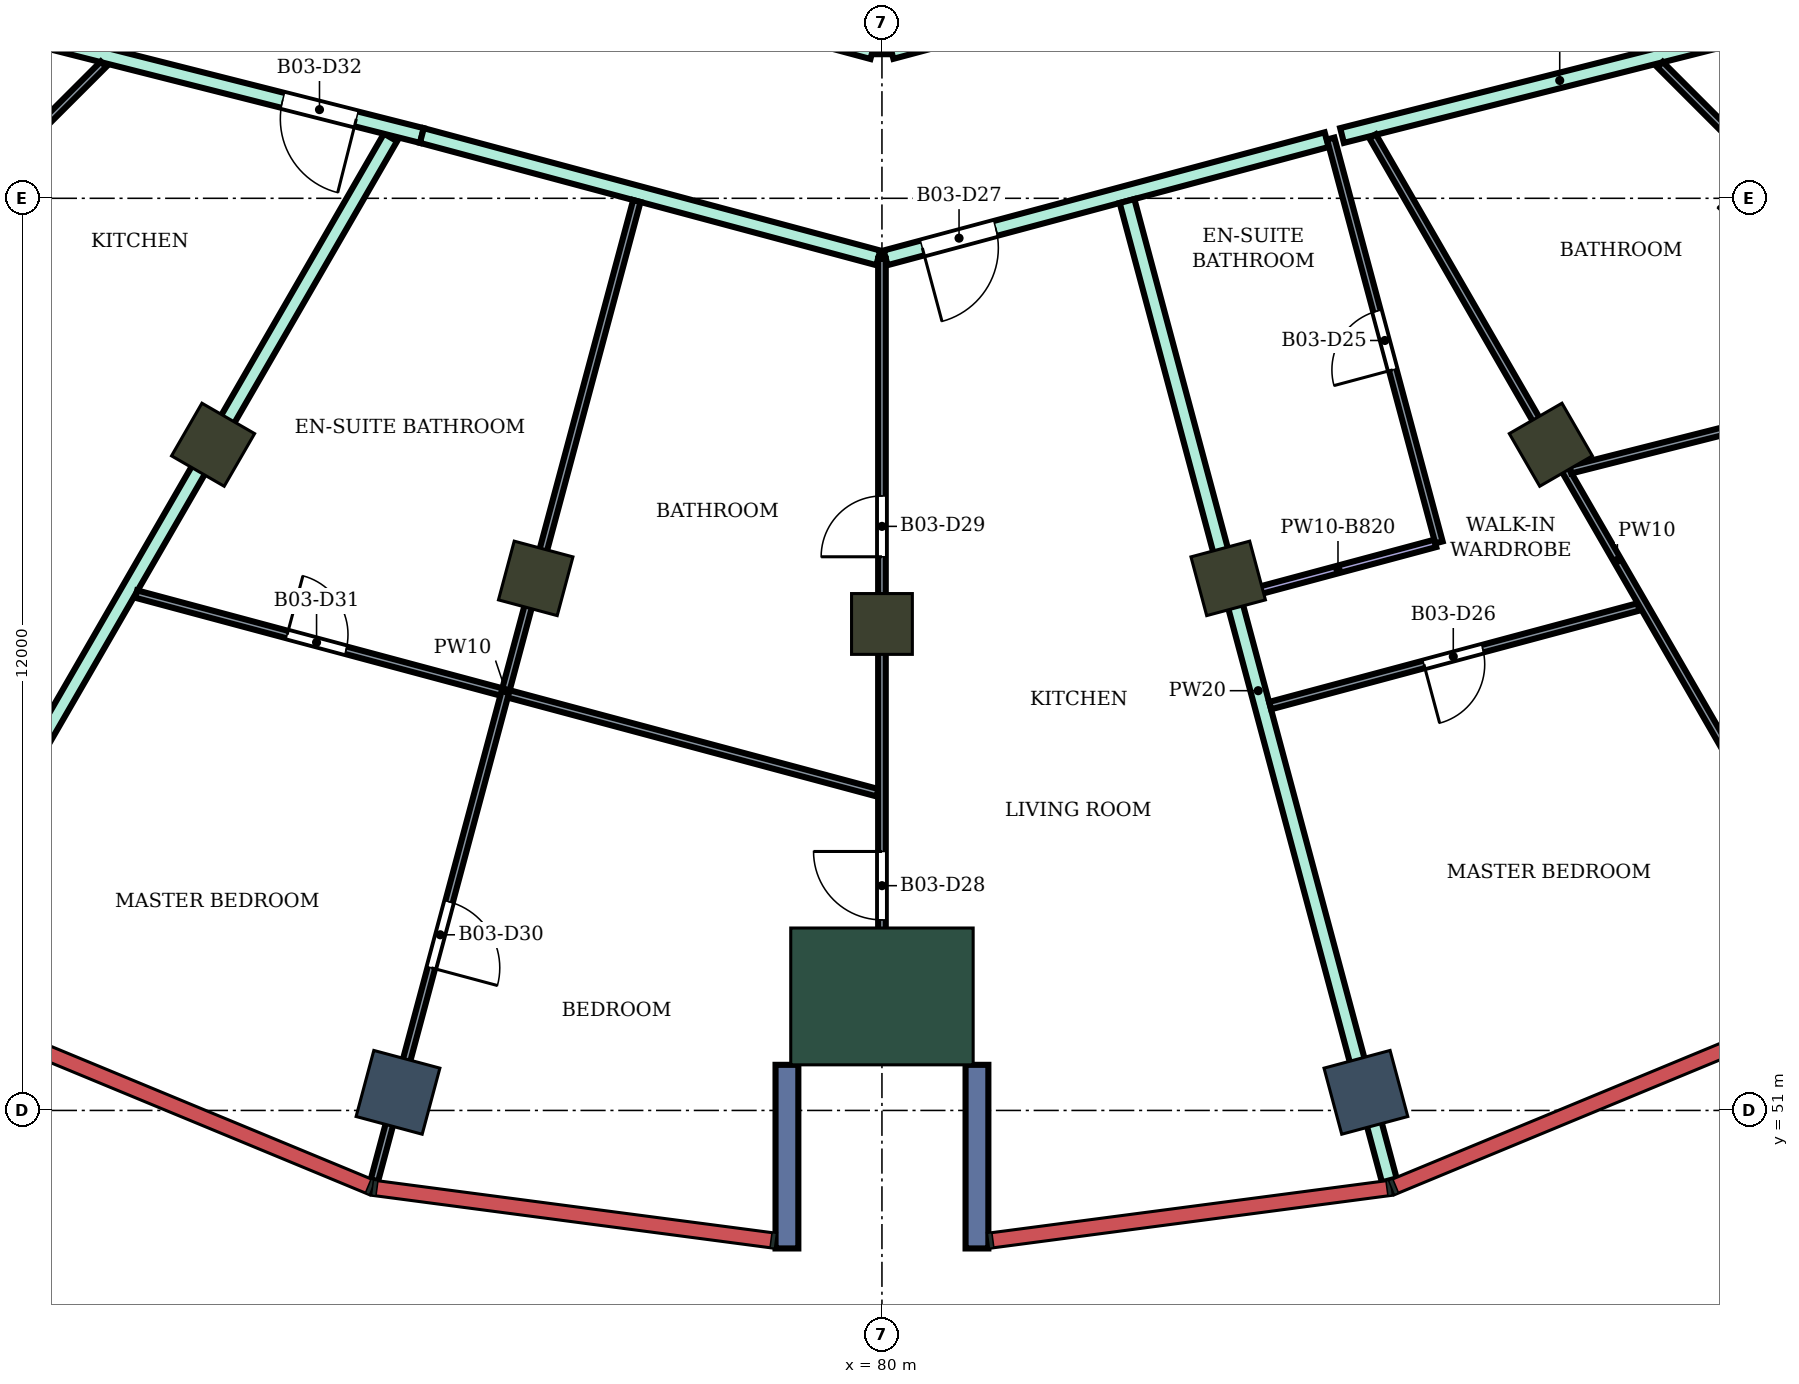
"""IFC4 building model, lengths in metres.
Left out: names, types, materials, properties, quantities, classifications, styles, units other than length and angle.
Written with IfcOpenShell. Run it as: python <this file> out.ifc"""

import sys

from ifc_helpers import new_model, si_unit, direction, frame, frame_2d, origin, origin_2d, place, context, subcontext, project, spatial, rectangle, extrude, element, fill, save


model = new_model("IFC4")
c1 = context("Model", 3, precision=1e-05, world=origin(), true_north=direction((0.0, 1.0)))
c2 = subcontext(c1, "Body", "Model", "MODEL_VIEW")
j1 = project(units=[si_unit("LENGTHUNIT", "METRE"), si_unit("PLANEANGLEUNIT", "RADIAN")], contexts=[c1])
p1 = place(None, origin())
s1 = spatial("IfcSite", under=j1, at=p1, CompositionType="ELEMENT")
p2 = place(p1, origin())
s2 = spatial("IfcBuilding", under=s1, at=p2, CompositionType="ELEMENT")
p3 = place(p2, frame((0.0, 0.0, 237.3)))
s3 = spatial("IfcBuildingStorey", under=s2, at=p3, CompositionType="ELEMENT", Elevation=237.3)
for number, where, z_axis, x_axis in (
    (1, (73.633, 51.238, 0.0), (0.0, 0.0, 1.0), (-0.259, -0.966, 0.0)),
    (2, (86.367, 51.238, 0.0), (0.0, 0.0, 1.0), (0.259, -0.966, 0.0)),
):
    element("IfcColumn", number, at=place(p3, frame(where, z_axis=z_axis, x_axis=x_axis)), inside=s3, PredefinedType="COLUMN", context=c2, shape_type="SweptSolid", body=[
        extrude(rectangle(XDim=0.9, YDim=0.9, at=origin_2d()), origin(), (0.0, 0.0, 1.0), 4.2),
    ])
for number, where, z_axis, x_axis in (
    (3, (71.2, 59.758, 0.0), (0.0, 0.0, 1.0), (-0.5, -0.866, 0.0)),
    (4, (75.445, 58.0, 0.0), (0.0, 0.0, 1.0), (-0.259, -0.966, 0.0)),
    (5, (80.0, 57.4, 0.0), (0.0, 0.0, 1.0), (0.0, -1.0, 0.0)),
    (6, (84.555, 58.0, 0.0), (0.0, 0.0, 1.0), (0.259, -0.966, 0.0)),
    (7, (88.8, 59.758, 0.0), (0.0, 0.0, 1.0), (0.5, -0.866, 0.0)),
):
    element("IfcColumn", number, at=place(p3, frame(where, z_axis=z_axis, x_axis=x_axis)), inside=s3, PredefinedType="COLUMN", context=c2, shape_type="SweptSolid", body=[
        extrude(rectangle(XDim=0.8, YDim=0.8, at=origin_2d()), origin(), (0.0, 0.0, 1.0), 4.2),
    ])
p4 = place(p3, frame((80.0, 52.5, 0.0), z_axis=(0.0, 0.0, 1.0), x_axis=(0.0, -1.0, 0.0)))
e8 = element("IfcColumn", 8, at=p4, inside=s3, PredefinedType="COLUMN", context=c2, shape_type="SweptSolid", body=[
    extrude(rectangle(XDim=1.8, YDim=2.4, at=origin_2d()), origin(), (0.0, 0.0, 1.0), 4.2),
])
for number, where, z_axis, x_axis in (
    (9, (78.75, 51.6, 0.0), (0.0, 0.0, 1.0), (0.0, -1.0, 0.0)),
    (10, (81.25, 51.6, 0.0), (0.0, 0.0, 1.0), (0.0, -1.0, 0.0)),
):
    element("IfcWall", number, at=place(p3, frame(where, z_axis=z_axis, x_axis=x_axis)), inside=s3, PredefinedType="NOTDEFINED", context=c2, shape_type="SweptSolid", body=[
        extrude(rectangle(XDim=2.416, YDim=0.3, at=frame_2d((1.208, 0.0))), origin(), (0.0, 0.0, 1.0), 4.2),
    ])
p5 = place(p3, frame((67.1, 52.659, 0.0), z_axis=(0.0, 0.0, 1.0), x_axis=(0.500128690501, 0.865951091539, 0.0)))
e11 = element("IfcWall", 11, at=p5, inside=s3, PredefinedType="PARTITIONING", context=c2, shape_type="SweptSolid", body=[
    extrude(rectangle(XDim=12.866, YDim=0.2, at=frame_2d((6.433, 0.0))), origin(), (0.0, 0.0, 1.0), 3.75),
])
p6 = place(p3, frame((68.2, 65.28, 0.0), z_axis=(0.0, 0.0, 1.0), x_axis=(0.969450596516, -0.245286650503, 0.0)))
e12 = element("IfcWall", 12, at=p6, inside=s3, PredefinedType="PARTITIONING", context=c2, shape_type="SweptSolid", body=[
    extrude(rectangle(XDim=5.928, YDim=0.2, at=frame_2d((2.964, 0.0))), origin(), (0.0, 0.0, 1.0), 3.75),
])
p7 = place(p6, frame((4.039, 0.0, 0.0)))
e13 = element("IfcOpeningElement", 13, at=p7, cuts=e12, PredefinedType="OPENING", context=c2, shape_type="SweptSolid", body=[
    extrude(rectangle(XDim=1.0, YDim=2.1, at=frame_2d((0.5, 1.05))), frame((0.0, 0.11, 0.0), z_axis=(0.0, -1.0, 0.0), x_axis=(1.0, 0.0, 0.0)), (0.0, 0.0, 1.0), 0.22),
])
p8 = place(p3, frame((73.947, 63.826, 0.0), z_axis=(0.0, 0.0, 1.0), x_axis=(0.965908253407, -0.258884619088, 0.0)))
e14 = element("IfcWall", 14, at=p8, inside=s3, PredefinedType="PARTITIONING", context=c2, shape_type="SweptSolid", body=[
    extrude(rectangle(XDim=6.217, YDim=0.2, at=frame_2d((3.108, 0.0))), origin(), (0.0, 0.0, 1.0), 3.75),
])
p9 = place(p3, frame((74.603, 66.342, 0.0), z_axis=(0.0, 0.0, 1.0), x_axis=(0.965920893652, -0.258837453254, 0.0)))
e15 = element("IfcWall", 15, at=p9, inside=s3, PredefinedType="PARTITIONING", context=c2, shape_type="SweptSolid", body=[
    extrude(rectangle(XDim=5.458, YDim=0.2, at=frame_2d((2.729, 0.0))), origin(), (0.0, 0.0, 1.0), 3.75),
])
p10 = place(p9, frame((2.512, 0.0, 0.0)))
e16 = element("IfcOpeningElement", 16, at=p10, cuts=e15, PredefinedType="OPENING", context=c2, shape_type="SweptSolid", body=[
    extrude(rectangle(XDim=0.9, YDim=2.1, at=frame_2d((0.45, 1.05))), frame((0.0, 0.11, 0.0), z_axis=(0.0, -1.0, 0.0), x_axis=(1.0, 0.0, 0.0)), (0.0, 0.0, 1.0), 0.22),
])
p11 = place(p3, frame((80.125, 64.932, 0.0), z_axis=(0.0, 0.0, 1.0), x_axis=(0.966236955806, 0.257655089674, 0.0)))
e17 = element("IfcWall", 17, at=p11, inside=s3, PredefinedType="PARTITIONING", context=c2, shape_type="SweptSolid", body=[
    extrude(rectangle(XDim=8.039, YDim=0.2, at=frame_2d((4.02, 0.0))), origin(), (0.0, 0.0, 1.0), 3.75),
])
p12 = place(p11, frame((6.298, 0.0, 0.0)))
e18 = element("IfcOpeningElement", 18, at=p12, cuts=e17, PredefinedType="OPENING", context=c2, shape_type="SweptSolid", body=[
    extrude(rectangle(XDim=0.9, YDim=2.1, at=frame_2d((0.45, 1.05))), frame((0.0, 0.11, 0.0), z_axis=(0.0, -1.0, 0.0), x_axis=(1.0, 0.0, 0.0)), (0.0, 0.0, 1.0), 0.22),
])
p13 = place(p11, frame((2.045, 0.0, 0.0)))
e19 = element("IfcOpeningElement", 19, at=p13, cuts=e17, PredefinedType="OPENING", context=c2, shape_type="SweptSolid", body=[
    extrude(rectangle(XDim=0.9, YDim=2.1, at=frame_2d((0.45, 1.05))), frame((0.0, 0.11, 0.0), z_axis=(0.0, -1.0, 0.0), x_axis=(1.0, 0.0, 0.0)), (0.0, 0.0, 1.0), 0.22),
])
p14 = place(p3, frame((80.048, 62.217, 0.0), z_axis=(0.0, 0.0, 1.0), x_axis=(0.965941520544, 0.258760466242, 0.0)))
e20 = element("IfcWall", 20, at=p14, inside=s3, PredefinedType="PARTITIONING", context=c2, shape_type="SweptSolid", body=[
    extrude(rectangle(XDim=6.006, YDim=0.2, at=frame_2d((3.003, 0.0))), origin(), (0.0, 0.0, 1.0), 3.75),
])
p15 = place(p14, frame((0.5, 0.0, 0.0)))
e21 = element("IfcOpeningElement", 21, at=p15, cuts=e20, PredefinedType="OPENING", context=c2, shape_type="SweptSolid", body=[
    extrude(rectangle(XDim=1.0, YDim=2.1, at=frame_2d((0.5, 1.05))), frame((0.0, 0.11, 0.0), z_axis=(0.0, -1.0, 0.0), x_axis=(1.0, 0.0, 0.0)), (0.0, 0.0, 1.0), 0.22),
])
p16 = place(p3, frame((80.0, 64.896, 0.0), z_axis=(0.0, 0.0, 1.0), x_axis=(0.0, 1.0, 0.0)))
e22 = element("IfcWall", 22, at=p16, inside=s3, PredefinedType="PARTITIONING", context=c2, shape_type="SweptSolid", body=[
    extrude(rectangle(XDim=2.405, YDim=0.2, at=frame_2d((1.203, 0.0))), origin(), (0.0, 0.0, 1.0), 3.75),
])
p17 = place(p3, frame((83.224, 62.964, 0.0), z_axis=(0.0, 0.0, 1.0), x_axis=(0.258742489642, -0.965946336012, 0.0)))
e23 = element("IfcWall", 23, at=p17, inside=s3, PredefinedType="PARTITIONING", context=c2, shape_type="SweptSolid", body=[
    extrude(rectangle(XDim=13.338, YDim=0.2, at=frame_2d((6.669, 0.0))), origin(), (0.0, 0.0, 1.0), 3.75),
])
p18 = place(p3, frame((86.053, 63.826, 0.0), z_axis=(0.0, 0.0, 1.0), x_axis=(0.969490004987, 0.245130843083, 0.0)))
e24 = element("IfcWall", 24, at=p18, inside=s3, PredefinedType="PARTITIONING", context=c2, shape_type="SweptSolid", body=[
    extrude(rectangle(XDim=5.908, YDim=0.2, at=frame_2d((2.954, 0.0))), origin(), (0.0, 0.0, 1.0), 3.75),
])
p19 = place(p3, frame((63.591, 58.6, 0.0), z_axis=(0.0, 0.0, 1.0), x_axis=(0.707274766636, 0.70693875582, 0.0)))
e25 = element("IfcWall", 25, at=p19, inside=s3, PredefinedType="PARTITIONING", context=c2, shape_type="SweptSolid", body=[
    extrude(rectangle(XDim=8.719, YDim=0.1, at=frame_2d((4.359, 0.0))), origin(), (0.0, 0.0, 1.0), 3.75),
])
p20 = place(p19, frame((1.729, 0.0, 0.0)))
e26 = element("IfcOpeningElement", 26, at=p20, cuts=e25, PredefinedType="OPENING", context=c2, shape_type="SweptSolid", body=[
    extrude(rectangle(XDim=0.9, YDim=2.1, at=frame_2d((0.45, 1.05))), frame((0.0, 0.06, 0.0), z_axis=(0.0, -1.0, 0.0), x_axis=(1.0, 0.0, 0.0)), (0.0, 0.0, 1.0), 0.12),
])
p21 = place(p19, frame((6.033, 0.0, 0.0)))
e27 = element("IfcOpeningElement", 27, at=p21, cuts=e25, PredefinedType="OPENING", context=c2, shape_type="SweptSolid", body=[
    extrude(rectangle(XDim=0.8, YDim=2.1, at=frame_2d((0.4, 1.05))), frame((0.0, 0.06, 0.0), z_axis=(0.0, -1.0, 0.0), x_axis=(1.0, 0.0, 0.0)), (0.0, 0.0, 1.0), 0.12),
])
p22 = place(p3, frame((70.188, 57.793, 0.0), z_axis=(0.0, 0.0, 1.0), x_axis=(0.965911138035, -0.258873856194, 0.0)))
e28 = element("IfcWall", 28, at=p22, inside=s3, PredefinedType="PARTITIONING", context=c2, shape_type="SweptSolid", body=[
    extrude(rectangle(XDim=10.098, YDim=0.1, at=frame_2d((5.049, 0.0))), origin(), (0.0, 0.0, 1.0), 3.75),
])
p23 = place(p22, frame((2.057, 0.0, 0.0)))
e29 = element("IfcOpeningElement", 29, at=p23, cuts=e28, PredefinedType="OPENING", context=c2, shape_type="SweptSolid", body=[
    extrude(rectangle(XDim=0.8, YDim=2.1, at=frame_2d((0.4, 1.05))), frame((0.0, 0.06, 0.0), z_axis=(0.0, -1.0, 0.0), x_axis=(1.0, 0.0, 0.0)), (0.0, 0.0, 1.0), 0.12),
])
p24 = place(p3, frame((73.323, 50.081, 0.0), z_axis=(0.0, 0.0, 1.0), x_axis=(0.258837030899, 0.96592100683, 0.0)))
e30 = element("IfcWall", 30, at=p24, inside=s3, PredefinedType="PARTITIONING", context=c2, shape_type="SweptSolid", body=[
    extrude(rectangle(XDim=13.338, YDim=0.1, at=frame_2d((6.669, 0.0))), origin(), (0.0, 0.0, 1.0), 3.75),
])
p25 = place(p24, frame((2.894, 0.0, 0.0)))
e31 = element("IfcOpeningElement", 31, at=p25, cuts=e30, PredefinedType="OPENING", context=c2, shape_type="SweptSolid", body=[
    extrude(rectangle(XDim=0.9, YDim=2.1, at=frame_2d((0.45, 1.05))), frame((0.0, 0.06, 0.0), z_axis=(0.0, -1.0, 0.0), x_axis=(1.0, 0.0, 0.0)), (0.0, 0.0, 1.0), 0.12),
])
p26 = place(p3, frame((80.0, 51.8, 0.0), z_axis=(0.0, 0.0, 1.0), x_axis=(0.0, 1.0, 0.0)))
e32 = element("IfcWall", 32, at=p26, inside=s3, PredefinedType="PARTITIONING", context=c2, shape_type="SweptSolid", body=[
    extrude(rectangle(XDim=10.404, YDim=0.1, at=frame_2d((5.202, 0.0))), origin(), (0.0, 0.0, 1.0), 3.75),
])
p27 = place(p26, frame((1.707, 0.0, 0.0)))
e33 = element("IfcOpeningElement", 33, at=p27, cuts=e32, PredefinedType="OPENING", context=c2, shape_type="SweptSolid", body=[
    extrude(rectangle(XDim=0.9, YDim=2.1, at=frame_2d((0.45, 1.05))), frame((0.0, 0.06, 0.0), z_axis=(0.0, -1.0, 0.0), x_axis=(1.0, 0.0, 0.0)), (0.0, 0.0, 1.0), 0.12),
])
p28 = place(p26, frame((6.484, 0.0, 0.0)))
e34 = element("IfcOpeningElement", 34, at=p28, cuts=e32, PredefinedType="OPENING", context=c2, shape_type="SweptSolid", body=[
    extrude(rectangle(XDim=0.8, YDim=2.1, at=frame_2d((0.4, 1.05))), frame((0.0, 0.06, 0.0), z_axis=(0.0, -1.0, 0.0), x_axis=(1.0, 0.0, 0.0)), (0.0, 0.0, 1.0), 0.12),
])
p29 = place(p3, frame((84.719, 57.774, 0.0), z_axis=(0.0, 0.0, 1.0), x_axis=(0.965902408875, 0.258906424273, 0.0)))
e35 = element("IfcWall", 35, at=p29, inside=s3, PredefinedType="PARTITIONING", context=c2, shape_type="SweptSolid", body=[
    extrude(rectangle(XDim=2.651, YDim=0.1, at=frame_2d((1.325, 0.0))), origin(), (0.0, 0.0, 1.0), 3.38),
])
p30 = place(p3, frame((85.108, 56.326, 0.0), z_axis=(0.0, 0.0, 1.0), x_axis=(0.965911122806, 0.258873913014, 0.0)))
e36 = element("IfcWall", 36, at=p30, inside=s3, PredefinedType="PARTITIONING", context=c2, shape_type="SweptSolid", body=[
    extrude(rectangle(XDim=5.017, YDim=0.1, at=frame_2d((2.509, 0.0))), origin(), (0.0, 0.0, 1.0), 3.75),
])
p31 = place(p30, frame((2.094, 0.0, 0.0)))
e37 = element("IfcOpeningElement", 37, at=p31, cuts=e36, PredefinedType="OPENING", context=c2, shape_type="SweptSolid", body=[
    extrude(rectangle(XDim=0.8, YDim=2.1, at=frame_2d((0.4, 1.05))), frame((0.0, 0.06, 0.0), z_axis=(0.0, -1.0, 0.0), x_axis=(1.0, 0.0, 0.0)), (0.0, 0.0, 1.0), 0.12),
])
p32 = place(p3, frame((85.904, 63.786, 0.0), z_axis=(0.0, 0.0, 1.0), x_axis=(0.258855888267, -0.96591595344, 0.0)))
e38 = element("IfcWall", 38, at=p32, inside=s3, PredefinedType="PARTITIONING", context=c2, shape_type="SweptSolid", body=[
    extrude(rectangle(XDim=5.5, YDim=0.1, at=frame_2d((2.75, 0.0))), origin(), (0.0, 0.0, 1.0), 3.75),
])
p33 = place(p32, frame((2.35, 0.0, 0.0)))
e39 = element("IfcOpeningElement", 39, at=p33, cuts=e38, PredefinedType="OPENING", context=c2, shape_type="SweptSolid", body=[
    extrude(rectangle(XDim=0.8, YDim=2.1, at=frame_2d((0.4, 1.05))), frame((0.0, 0.06, 0.0), z_axis=(0.0, -1.0, 0.0), x_axis=(1.0, 0.0, 0.0)), (0.0, 0.0, 1.0), 0.12),
])
p34 = place(p3, frame((86.454, 63.818, 0.0), z_axis=(0.0, 0.0, 1.0), x_axis=(0.499914882008, -0.866074541103, 0.0)))
e40 = element("IfcWall", 40, at=p34, inside=s3, PredefinedType="PARTITIONING", context=c2, shape_type="SweptSolid", body=[
    extrude(rectangle(XDim=12.886, YDim=0.1, at=frame_2d((6.443, 0.0))), origin(), (0.0, 0.0, 1.0), 3.75),
])
p35 = place(p34, frame((9.524, 0.0, 0.0)))
e41 = element("IfcOpeningElement", 41, at=p35, cuts=e40, PredefinedType="OPENING", context=c2, shape_type="SweptSolid", body=[
    extrude(rectangle(XDim=0.9, YDim=2.1, at=frame_2d((0.45, 1.05))), frame((0.0, 0.06, 0.0), z_axis=(0.0, -1.0, 0.0), x_axis=(1.0, 0.0, 0.0)), (0.0, 0.0, 1.0), 0.12),
])
p36 = place(p3, frame((89.058, 59.429, 0.0), z_axis=(0.0, 0.0, 1.0), x_axis=(0.96946321375, 0.2452367778, 0.0)))
e42 = element("IfcWall", 42, at=p36, inside=s3, PredefinedType="PARTITIONING", context=c2, shape_type="SweptSolid", body=[
    extrude(rectangle(XDim=5.272, YDim=0.1, at=frame_2d((2.636, 0.0))), origin(), (0.0, 0.0, 1.0), 3.75),
])
p37 = place(p3, frame((90.237, 64.759, 0.0), z_axis=(0.0, 0.0, 1.0), x_axis=(0.706952774706, -0.707260754132, 0.0)))
e43 = element("IfcWall", 43, at=p37, inside=s3, PredefinedType="PARTITIONING", context=c2, shape_type="SweptSolid", body=[
    extrude(rectangle(XDim=8.72, YDim=0.1, at=frame_2d((4.36, 0.0))), origin(), (0.0, 0.0, 1.0), 3.75),
])
p38 = place(p37, frame((6.114, 0.0, 0.0)))
e44 = element("IfcOpeningElement", 44, at=p38, cuts=e43, PredefinedType="OPENING", context=c2, shape_type="SweptSolid", body=[
    extrude(rectangle(XDim=0.9, YDim=2.1, at=frame_2d((0.45, 1.05))), frame((0.0, 0.06, 0.0), z_axis=(0.0, -1.0, 0.0), x_axis=(1.0, 0.0, 0.0)), (0.0, 0.0, 1.0), 0.12),
])
p39 = place(p37, frame((1.872, 0.0, 0.0)))
e45 = element("IfcOpeningElement", 45, at=p39, cuts=e43, PredefinedType="OPENING", context=c2, shape_type="SweptSolid", body=[
    extrude(rectangle(XDim=0.8, YDim=2.1, at=frame_2d((0.4, 1.05))), frame((0.0, 0.06, 0.0), z_axis=(0.0, -1.0, 0.0), x_axis=(1.0, 0.0, 0.0)), (0.0, 0.0, 1.0), 0.12),
])
p40 = place(p33, frame((0.8, 0.0, 0.0), z_axis=(0.0, 0.0, 1.0), x_axis=(-1.0, 0.0, 0.0)))
e46 = element("IfcDoor", 46, at=p40, inside=s3, OperationType="SINGLE_SWING_LEFT", PredefinedType="DOOR", context=c2, shape_type="SweptSolid", body=[
    extrude(rectangle(XDim=0.8, YDim=2.1, at=frame_2d((0.4, 1.05))), frame((0.0, 0.025, 0.0), z_axis=(0.0, -1.0, 0.0), x_axis=(1.0, 0.0, 0.0)), (0.0, 0.0, 1.0), 0.05),
])
fill(e39, e46)
p41 = place(p31, frame((0.8, 0.0, 0.0), z_axis=(0.0, 0.0, 1.0), x_axis=(-1.0, 0.0, 0.0)))
e47 = element("IfcDoor", 47, at=p41, inside=s3, OperationType="SINGLE_SWING_RIGHT", PredefinedType="DOOR", context=c2, shape_type="SweptSolid", body=[
    extrude(rectangle(XDim=0.8, YDim=2.1, at=frame_2d((0.4, 1.05))), frame((0.0, 0.025, 0.0), z_axis=(0.0, -1.0, 0.0), x_axis=(1.0, 0.0, 0.0)), (0.0, 0.0, 1.0), 0.05),
])
fill(e37, e47)
p42 = place(p15, frame((1.0, 0.0, 0.0), z_axis=(0.0, 0.0, 1.0), x_axis=(-1.0, 0.0, 0.0)))
e48 = element("IfcDoor", 48, at=p42, inside=s3, OperationType="SINGLE_SWING_RIGHT", PredefinedType="DOOR", context=c2, shape_type="SweptSolid", body=[
    extrude(rectangle(XDim=1.0, YDim=2.1, at=frame_2d((0.5, 1.05))), frame((0.0, 0.025, 0.0), z_axis=(0.0, -1.0, 0.0), x_axis=(1.0, 0.0, 0.0)), (0.0, 0.0, 1.0), 0.05),
])
fill(e21, e48)
p43 = place(p27, origin())
e49 = element("IfcDoor", 49, at=p43, inside=s3, OperationType="SINGLE_SWING_RIGHT", PredefinedType="DOOR", context=c2, shape_type="SweptSolid", body=[
    extrude(rectangle(XDim=0.9, YDim=2.1, at=frame_2d((0.45, 1.05))), frame((0.0, 0.025, 0.0), z_axis=(0.0, -1.0, 0.0), x_axis=(1.0, 0.0, 0.0)), (0.0, 0.0, 1.0), 0.05),
])
fill(e33, e49)
p44 = place(p28, origin())
e50 = element("IfcDoor", 50, at=p44, inside=s3, OperationType="SINGLE_SWING_LEFT", PredefinedType="DOOR", context=c2, shape_type="SweptSolid", body=[
    extrude(rectangle(XDim=0.8, YDim=2.1, at=frame_2d((0.4, 1.05))), frame((0.0, 0.025, 0.0), z_axis=(0.0, -1.0, 0.0), x_axis=(1.0, 0.0, 0.0)), (0.0, 0.0, 1.0), 0.05),
])
fill(e34, e50)
p45 = place(p25, frame((0.9, 0.0, 0.0), z_axis=(0.0, 0.0, 1.0), x_axis=(-1.0, 0.0, 0.0)))
e51 = element("IfcDoor", 51, at=p45, inside=s3, OperationType="SINGLE_SWING_RIGHT", PredefinedType="DOOR", context=c2, shape_type="SweptSolid", body=[
    extrude(rectangle(XDim=0.9, YDim=2.1, at=frame_2d((0.45, 1.05))), frame((0.0, 0.025, 0.0), z_axis=(0.0, -1.0, 0.0), x_axis=(1.0, 0.0, 0.0)), (0.0, 0.0, 1.0), 0.05),
])
fill(e31, e51)
p46 = place(p23, origin())
e52 = element("IfcDoor", 52, at=p46, inside=s3, OperationType="SINGLE_SWING_LEFT", PredefinedType="DOOR", context=c2, shape_type="SweptSolid", body=[
    extrude(rectangle(XDim=0.8, YDim=2.1, at=frame_2d((0.4, 1.05))), frame((0.0, 0.025, 0.0), z_axis=(0.0, -1.0, 0.0), x_axis=(1.0, 0.0, 0.0)), (0.0, 0.0, 1.0), 0.05),
])
fill(e29, e52)
p47 = place(p7, frame((1.0, 0.0, 0.0), z_axis=(0.0, 0.0, 1.0), x_axis=(-1.0, 0.0, 0.0)))
e53 = element("IfcDoor", 53, at=p47, inside=s3, OperationType="SINGLE_SWING_LEFT", PredefinedType="DOOR", context=c2, shape_type="SweptSolid", body=[
    extrude(rectangle(XDim=1.0, YDim=2.1, at=frame_2d((0.5, 1.05))), frame((0.0, 0.025, 0.0), z_axis=(0.0, -1.0, 0.0), x_axis=(1.0, 0.0, 0.0)), (0.0, 0.0, 1.0), 0.05),
])
fill(e13, e53)
save(model, sys.argv[1])
